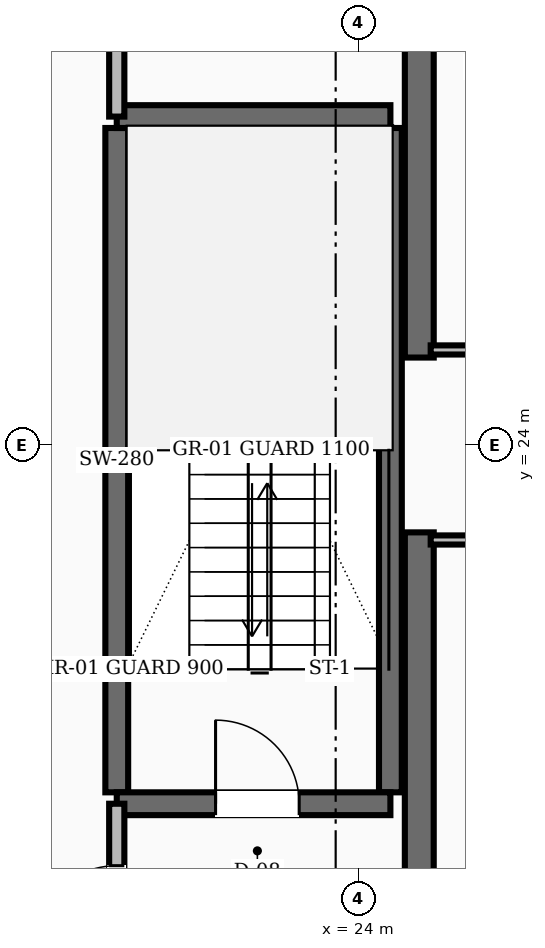
"""IFC4 building model, lengths in metres.
Left out: names, types, materials, properties, quantities, classifications, styles, units other than length and angle.
Written with IfcOpenShell. Run it as: python <this file> out.ifc"""

import sys

from ifc_helpers import new_model, si_unit, direction, frame, frame_2d, origin, place, context, subcontext, project, spatial, rectangle, extrude, element, fill, save


model = new_model("IFC4")
c1 = context("Model", 3, precision=1e-05, world=origin(), true_north=direction((0.0, 1.0)))
c2 = subcontext(c1, "Body", "Model", "MODEL_VIEW")
j1 = project(units=[si_unit("LENGTHUNIT", "METRE"), si_unit("PLANEANGLEUNIT", "RADIAN")], contexts=[c1])
p1 = place(None, origin())
s1 = spatial("IfcSite", under=j1, at=p1, CompositionType="ELEMENT")
p2 = place(p1, origin())
s2 = spatial("IfcBuilding", under=s1, at=p2, CompositionType="ELEMENT")
p3 = place(p2, frame((0.0, 0.0, 70.0)))
s3 = spatial("IfcBuildingStorey", under=s2, at=p3, CompositionType="ELEMENT", Elevation=70.0)
for number, where, z_axis, x_axis in (
    (1, (24.8, 16.55, 0.0), (0.0, 0.0, 1.0), (0.0, 1.0, 0.0)),
    (2, (24.8, 25.15, 0.0), (0.0, 0.0, 1.0), (0.0, 1.0, 0.0)),
):
    element("IfcWall", number, at=place(p3, frame(where, z_axis=z_axis, x_axis=x_axis)), inside=s3, PredefinedType="SHEAR", context=c2, shape_type="SweptSolid", body=[
        extrude(rectangle(XDim=6.3, YDim=0.38, at=frame_2d((3.15, 0.0))), origin(), (0.0, 0.0, 1.0), 3.6),
    ])
for number, where, z_axis, x_axis in (
    (3, (20.82, 19.43, 0.0), (0.0, 0.0, 1.0), (0.0, 1.0, 0.0)),
    (4, (24.42, 19.43, 0.0), (0.0, 0.0, 1.0), (0.0, 1.0, 0.0)),
):
    element("IfcWall", number, at=place(p3, frame(where, z_axis=z_axis, x_axis=x_axis)), inside=s3, PredefinedType="SHEAR", context=c2, shape_type="SweptSolid", body=[
        extrude(rectangle(XDim=8.74, YDim=0.3, at=frame_2d((4.37, 0.0))), origin(), (0.0, 0.0, 1.0), 3.6),
    ])
p4 = place(p3, frame((20.82, 19.28, 0.0), z_axis=(0.0, 0.0, 1.0), x_axis=(1.0, 0.0, 0.0)))
e5 = element("IfcWall", 5, at=p4, inside=s3, PredefinedType="SHEAR", context=c2, shape_type="SweptSolid", body=[
    extrude(rectangle(XDim=3.6, YDim=0.3, at=frame_2d((1.8, 0.0))), origin(), (0.0, 0.0, 1.0), 3.6),
])
p5 = place(p4, frame((1.3, 0.0, 0.0)))
e6 = element("IfcOpeningElement", 6, at=p5, cuts=e5, PredefinedType="OPENING", context=c2, shape_type="SweptSolid", body=[
    extrude(rectangle(XDim=1.1, YDim=2.1, at=frame_2d((0.55, 1.05))), frame((0.0, 0.16, 0.0), z_axis=(0.0, -1.0, 0.0), x_axis=(1.0, 0.0, 0.0)), (0.0, 0.0, 1.0), 0.32),
])
p6 = place(p3, frame((20.82, 28.32, 0.0), z_axis=(0.0, 0.0, 1.0), x_axis=(1.0, 0.0, 0.0)))
e7 = element("IfcWall", 7, at=p6, inside=s3, PredefinedType="SHEAR", context=c2, shape_type="SweptSolid", body=[
    extrude(rectangle(XDim=3.6, YDim=0.3, at=frame_2d((1.8, 0.0))), origin(), (0.0, 0.0, 1.0), 3.6),
])
p7 = place(p3, frame((20.82, 16.55, 0.0), z_axis=(0.0, 0.0, 1.0), x_axis=(0.0, 1.0, 0.0)))
e8 = element("IfcWall", 8, at=p7, inside=s3, PredefinedType="SOLIDWALL", context=c2, shape_type="SweptSolid", body=[
    extrude(rectangle(XDim=2.73, YDim=0.2, at=frame_2d((1.365, 0.0))), origin(), (0.0, 0.0, 1.0), 2.71),
])
p8 = place(p7, frame((0.815, 0.0, 0.0)))
e9 = element("IfcOpeningElement", 9, at=p8, cuts=e8, PredefinedType="OPENING", context=c2, shape_type="SweptSolid", body=[
    extrude(rectangle(XDim=1.1, YDim=2.1, at=frame_2d((0.55, 1.05))), frame((0.0, 0.11, 0.0), z_axis=(0.0, -1.0, 0.0), x_axis=(1.0, 0.0, 0.0)), (0.0, 0.0, 1.0), 0.22),
])
p9 = place(p3, frame((20.82, 28.32, 0.0), z_axis=(0.0, 0.0, 1.0), x_axis=(0.0, 1.0, 0.0)))
e10 = element("IfcWall", 10, at=p9, inside=s3, PredefinedType="SOLIDWALL", context=c2, shape_type="SweptSolid", body=[
    extrude(rectangle(XDim=3.13, YDim=0.2, at=frame_2d((1.565, 0.0))), origin(), (0.0, 0.0, 1.0), 2.71),
])
p10 = place(p9, frame((1.09, 0.0, 0.0)))
e11 = element("IfcOpeningElement", 11, at=p10, cuts=e10, PredefinedType="OPENING", context=c2, shape_type="SweptSolid", body=[
    extrude(rectangle(XDim=0.95, YDim=2.1, at=frame_2d((0.475, 1.05))), frame((0.0, 0.11, 0.0), z_axis=(0.0, -1.0, 0.0), x_axis=(1.0, 0.0, 0.0)), (0.0, 0.0, 1.0), 0.22),
])
p11 = place(p3, frame((24.95, 25.25, 0.0), z_axis=(0.0, 0.0, 1.0), x_axis=(1.0, 0.0, 0.0)))
e12 = element("IfcWall", 12, at=p11, inside=s3, PredefinedType="PARTITIONING", context=c2, shape_type="SweptSolid", body=[
    extrude(rectangle(XDim=3.2, YDim=0.12, at=frame_2d((1.6, 0.0))), origin(), (0.0, 0.0, 1.0), 2.71),
])
p12 = place(p11, frame((1.125, 0.0, 0.0)))
e13 = element("IfcOpeningElement", 13, at=p12, cuts=e12, PredefinedType="OPENING", context=c2, shape_type="SweptSolid", body=[
    extrude(rectangle(XDim=0.95, YDim=2.1, at=frame_2d((0.475, 1.05))), frame((0.0, 0.07, 0.0), z_axis=(0.0, -1.0, 0.0), x_axis=(1.0, 0.0, 0.0)), (0.0, 0.0, 1.0), 0.14),
])
p13 = place(p3, frame((24.95, 22.75, 0.0), z_axis=(0.0, 0.0, 1.0), x_axis=(1.0, 0.0, 0.0)))
e14 = element("IfcWall", 14, at=p13, inside=s3, PredefinedType="PARTITIONING", context=c2, shape_type="SweptSolid", body=[
    extrude(rectangle(XDim=3.2, YDim=0.12, at=frame_2d((1.6, 0.0))), origin(), (0.0, 0.0, 1.0), 2.71),
])
p14 = place(p13, frame((1.125, 0.0, 0.0)))
e15 = element("IfcOpeningElement", 15, at=p14, cuts=e14, PredefinedType="OPENING", context=c2, shape_type="SweptSolid", body=[
    extrude(rectangle(XDim=0.95, YDim=2.1, at=frame_2d((0.475, 1.05))), frame((0.0, 0.07, 0.0), z_axis=(0.0, -1.0, 0.0), x_axis=(1.0, 0.0, 0.0)), (0.0, 0.0, 1.0), 0.14),
])
p15 = place(p5, origin())
e16 = element("IfcDoor", 16, at=p15, inside=s3, OperationType="SINGLE_SWING_LEFT", PredefinedType="DOOR", context=c2, shape_type="SweptSolid", body=[
    extrude(rectangle(XDim=1.1, YDim=2.1, at=frame_2d((0.55, 1.05))), frame((0.0, 0.025, 0.0), z_axis=(0.0, -1.0, 0.0), x_axis=(1.0, 0.0, 0.0)), (0.0, 0.0, 1.0), 0.05),
])
fill(e6, e16)
p16 = place(p8, origin())
e17 = element("IfcDoor", 17, at=p16, inside=s3, OperationType="SINGLE_SWING_LEFT", PredefinedType="DOOR", context=c2, shape_type="SweptSolid", body=[
    extrude(rectangle(XDim=1.1, YDim=2.1, at=frame_2d((0.55, 1.05))), frame((0.0, 0.025, 0.0), z_axis=(0.0, -1.0, 0.0), x_axis=(1.0, 0.0, 0.0)), (0.0, 0.0, 1.0), 0.05),
])
fill(e9, e17)
save(model, sys.argv[1])
